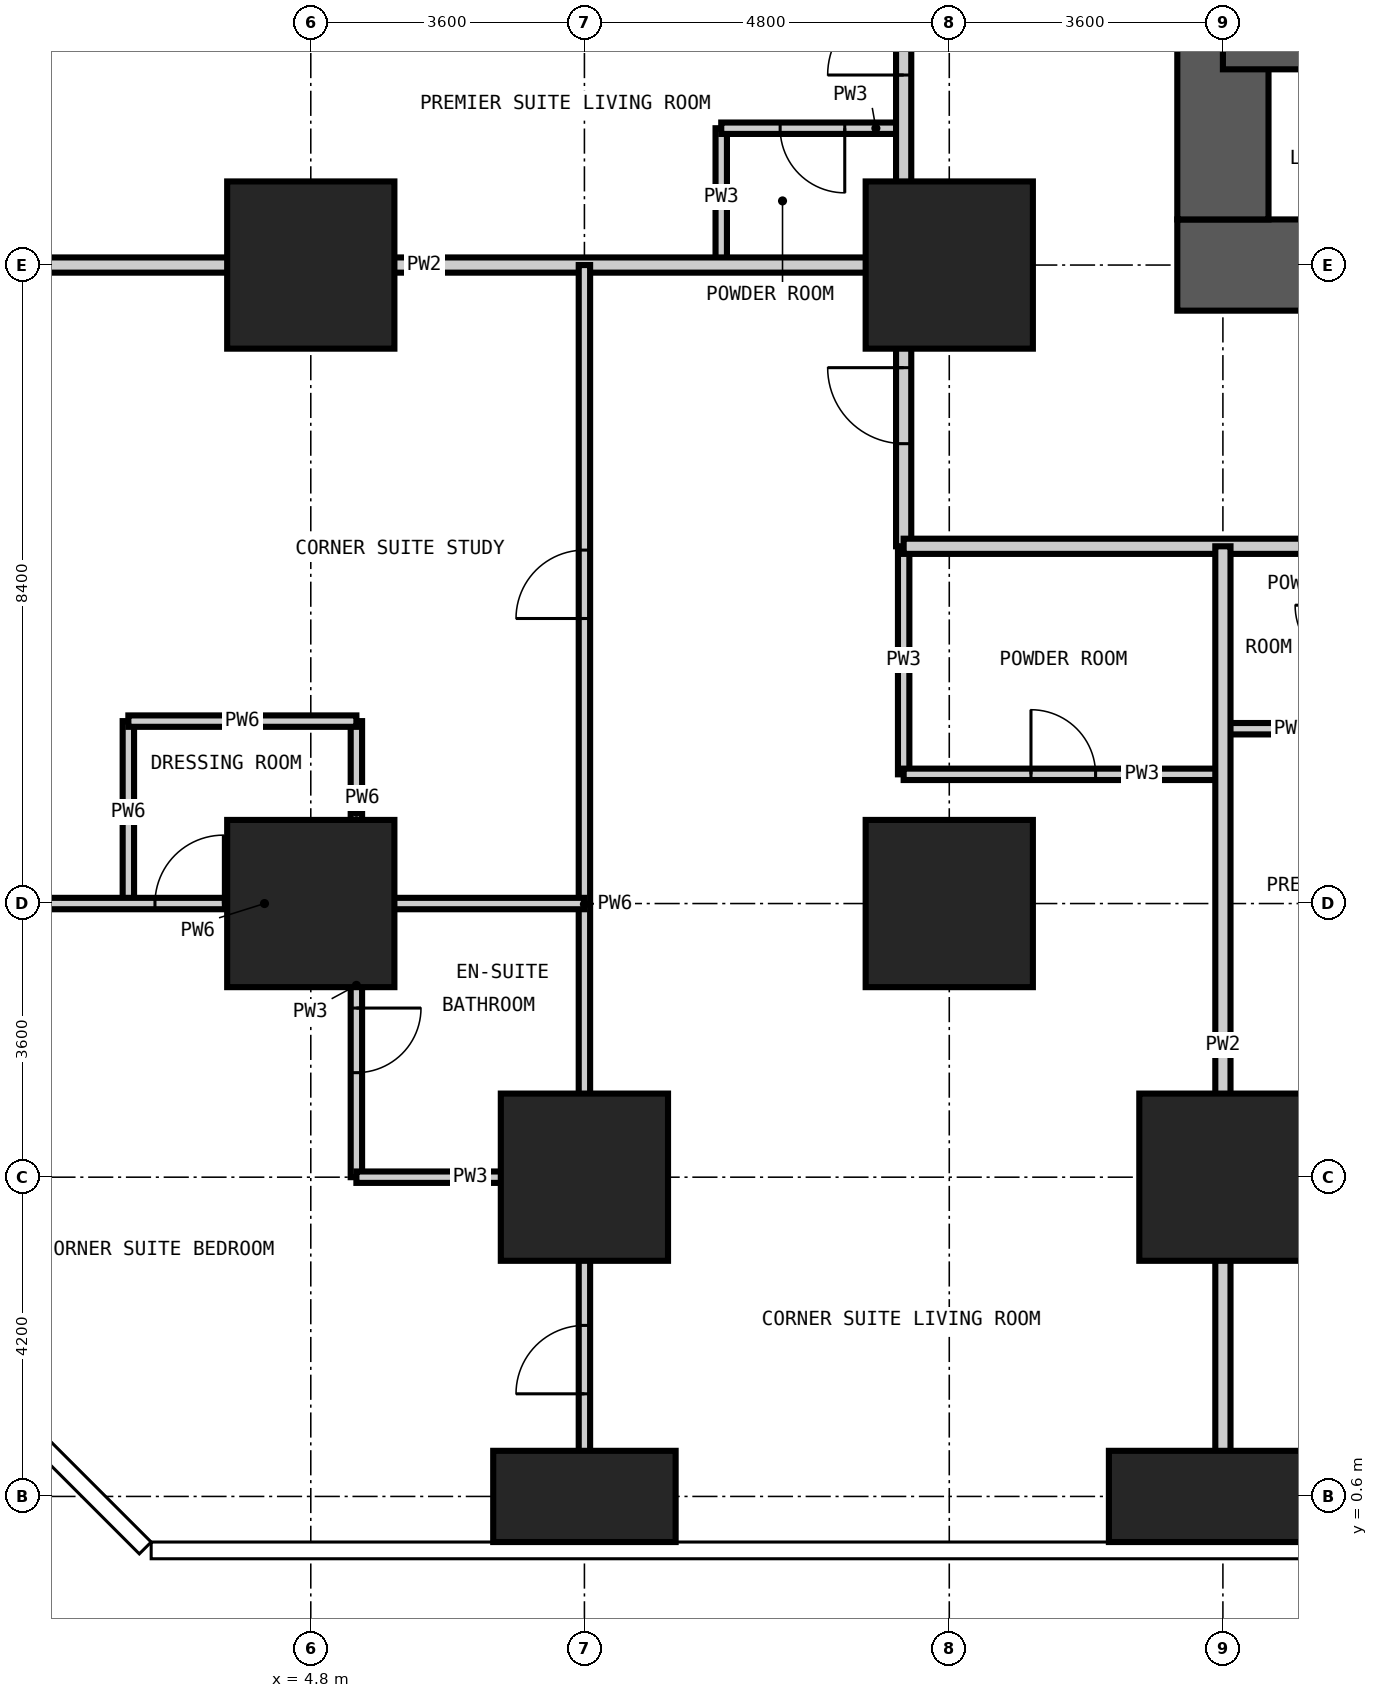
"""IFC4 building model, lengths in metres.
Left out: names, types, materials, properties, quantities, classifications, styles, units other than length and angle.
Written with IfcOpenShell. Run it as: python <this file> out.ifc"""

import sys

from ifc_helpers import new_model, si_unit, direction, frame, frame_2d, origin, origin_2d, place, context, subcontext, project, spatial, rectangle, extrude, element, fill, save


model = new_model("IFC4")
c1 = context("Model", 3, precision=1e-05, world=origin(), true_north=direction((0.0, 1.0)))
c2 = subcontext(c1, "Body", "Model", "MODEL_VIEW")
j1 = project(units=[si_unit("LENGTHUNIT", "METRE"), si_unit("PLANEANGLEUNIT", "RADIAN")], contexts=[c1])
p1 = place(None, origin())
s1 = spatial("IfcSite", under=j1, at=p1, CompositionType="ELEMENT")
p2 = place(p1, origin())
s2 = spatial("IfcBuilding", under=s1, at=p2, CompositionType="ELEMENT")
p3 = place(p2, frame((0.0, 0.0, 93.6)))
s3 = spatial("IfcBuildingStorey", under=s2, at=p3, CompositionType="ELEMENT", Elevation=93.6)
for number, where, z_axis, x_axis in (
    (1, (4.8, 8.4, -0.35), (0.0, 0.0, 1.0), (1.0, 0.0, 0.0)),
    (2, (4.8, 16.8, -0.35), (0.0, 0.0, 1.0), (1.0, 0.0, 0.0)),
):
    element("IfcColumn", number, at=place(p3, frame(where, z_axis=z_axis, x_axis=x_axis)), inside=s3, PredefinedType="COLUMN", context=c2, shape_type="SweptSolid", body=[
        extrude(rectangle(XDim=2.2, YDim=2.2, at=origin_2d()), origin(), (0.0, 0.0, 1.0), 3.6),
    ])
p4 = place(p3, frame((8.4, 0.6, -0.35), z_axis=(0.0, 0.0, 1.0), x_axis=(1.0, 0.0, 0.0)))
e3 = element("IfcColumn", 3, at=p4, inside=s3, PredefinedType="COLUMN", context=c2, shape_type="SweptSolid", body=[
    extrude(rectangle(XDim=2.4, YDim=1.2, at=origin_2d()), origin(), (0.0, 0.0, 1.0), 3.6),
])
for number, where, z_axis, x_axis in (
    (4, (8.4, 4.8, -0.35), (0.0, 0.0, 1.0), (1.0, 0.0, 0.0)),
    (5, (13.2, 8.4, -0.35), (0.0, 0.0, 1.0), (1.0, 0.0, 0.0)),
    (6, (13.2, 16.8, -0.35), (0.0, 0.0, 1.0), (1.0, 0.0, 0.0)),
):
    element("IfcColumn", number, at=place(p3, frame(where, z_axis=z_axis, x_axis=x_axis)), inside=s3, PredefinedType="COLUMN", context=c2, shape_type="SweptSolid", body=[
        extrude(rectangle(XDim=2.2, YDim=2.2, at=origin_2d()), origin(), (0.0, 0.0, 1.0), 3.6),
    ])
p5 = place(p3, frame((16.8, 0.6, -0.35), z_axis=(0.0, 0.0, 1.0), x_axis=(1.0, 0.0, 0.0)))
e7 = element("IfcColumn", 7, at=p5, inside=s3, PredefinedType="COLUMN", context=c2, shape_type="SweptSolid", body=[
    extrude(rectangle(XDim=3.0, YDim=1.2, at=origin_2d()), origin(), (0.0, 0.0, 1.0), 3.6),
])
p6 = place(p3, frame((16.8, 4.8, -0.35), z_axis=(0.0, 0.0, 1.0), x_axis=(1.0, 0.0, 0.0)))
e8 = element("IfcColumn", 8, at=p6, inside=s3, PredefinedType="COLUMN", context=c2, shape_type="SweptSolid", body=[
    extrude(rectangle(XDim=2.2, YDim=2.2, at=origin_2d()), origin(), (0.0, 0.0, 1.0), 3.6),
])
p7 = place(p3, frame((16.2, 16.8, -0.35), z_axis=(0.0, 0.0, 1.0), x_axis=(1.0, 0.0, 0.0)))
e9 = element("IfcWall", 9, at=p7, inside=s3, PredefinedType="SHEAR", context=c2, shape_type="SweptSolid", body=[
    extrude(rectangle(XDim=26.4, YDim=1.2, at=frame_2d((13.2, 0.0))), origin(), (0.0, 0.0, 1.0), 3.6),
])
p8 = place(p7, frame((12.7, 0.0, 0.35)))
e10 = element("IfcOpeningElement", 10, at=p8, cuts=e9, PredefinedType="OPENING", context=c2, shape_type="SweptSolid", body=[
    extrude(rectangle(XDim=1.0, YDim=2.1, at=frame_2d((0.5, 1.05))), frame((0.0, 0.61, 0.0), z_axis=(0.0, -1.0, 0.0), x_axis=(1.0, 0.0, 0.0)), (0.0, 0.0, 1.0), 1.22),
])
p9 = place(p7, frame((19.0, 0.0, 0.35)))
e11 = element("IfcOpeningElement", 11, at=p9, cuts=e9, PredefinedType="OPENING", context=c2, shape_type="SweptSolid", body=[
    extrude(rectangle(XDim=1.0, YDim=2.1, at=frame_2d((0.5, 1.05))), frame((0.0, 0.61, 0.0), z_axis=(0.0, -1.0, 0.0), x_axis=(1.0, 0.0, 0.0)), (0.0, 0.0, 1.0), 1.22),
])
p10 = place(p3, frame((16.8, 41.4, -0.35), z_axis=(0.0, 0.0, 1.0), x_axis=(0.0, -1.0, 0.0)))
e12 = element("IfcWall", 12, at=p10, inside=s3, PredefinedType="SHEAR", context=c2, shape_type="SweptSolid", body=[
    extrude(rectangle(XDim=24.0, YDim=1.2, at=frame_2d((12.0, 0.0))), origin(), (0.0, 0.0, 1.0), 3.6),
])
p11 = place(p10, frame((11.1, 0.0, 0.35)))
e13 = element("IfcOpeningElement", 13, at=p11, cuts=e12, PredefinedType="OPENING", context=c2, shape_type="SweptSolid", body=[
    extrude(rectangle(XDim=1.8, YDim=2.2, at=frame_2d((0.9, 1.1))), frame((0.0, 0.61, 0.0), z_axis=(0.0, -1.0, 0.0), x_axis=(1.0, 0.0, 0.0)), (0.0, 0.0, 1.0), 1.22),
])
p12 = place(p10, frame((19.9, 0.0, 0.35)))
e14 = element("IfcOpeningElement", 14, at=p12, cuts=e12, PredefinedType="OPENING", context=c2, shape_type="SweptSolid", body=[
    extrude(rectangle(XDim=1.0, YDim=2.1, at=frame_2d((0.5, 1.05))), frame((0.0, 0.61, 0.0), z_axis=(0.0, -1.0, 0.0), x_axis=(1.0, 0.0, 0.0)), (0.0, 0.0, 1.0), 1.22),
])
p13 = place(p10, frame((5.2, 0.0, 0.35)))
e15 = element("IfcOpeningElement", 15, at=p13, cuts=e12, PredefinedType="OPENING", context=c2, shape_type="SweptSolid", body=[
    extrude(rectangle(XDim=1.0, YDim=2.1, at=frame_2d((0.5, 1.05))), frame((0.0, 0.61, 0.0), z_axis=(0.0, -1.0, 0.0), x_axis=(1.0, 0.0, 0.0)), (0.0, 0.0, 1.0), 1.22),
])
p14 = place(p3, frame((16.8, 19.6, -0.35), z_axis=(0.0, 0.0, 1.0), x_axis=(1.0, 0.0, 0.0)))
e16 = element("IfcWall", 16, at=p14, inside=s3, PredefinedType="SHEAR", context=c2, shape_type="SweptSolid", body=[
    extrude(rectangle(XDim=8.4, YDim=0.45, at=frame_2d((4.2, 0.0))), origin(), (0.0, 0.0, 1.0), 3.6),
])
p15 = place(p3, frame((5.4, 4.8, 0.0), z_axis=(0.0, 0.0, 1.0), x_axis=(0.0, 1.0, 0.0)))
e17 = element("IfcWall", 17, at=p15, inside=s3, PredefinedType="PARTITIONING", context=c2, shape_type="SweptSolid", body=[
    extrude(rectangle(XDim=3.6, YDim=0.15, at=frame_2d((1.8, 0.0))), origin(), (0.0, 0.0, 1.0), 3.25),
])
p16 = place(p15, frame((1.375, 0.0, 0.0)))
e18 = element("IfcOpeningElement", 18, at=p16, cuts=e17, PredefinedType="OPENING", context=c2, shape_type="SweptSolid", body=[
    extrude(rectangle(XDim=0.85, YDim=2.1, at=frame_2d((0.425, 1.05))), frame((0.0, 0.085, 0.0), z_axis=(0.0, -1.0, 0.0), x_axis=(1.0, 0.0, 0.0)), (0.0, 0.0, 1.0), 0.17),
])
p17 = place(p3, frame((10.2, 16.8, 0.0), z_axis=(0.0, 0.0, 1.0), x_axis=(0.0, 1.0, 0.0)))
e19 = element("IfcWall", 19, at=p17, inside=s3, PredefinedType="PARTITIONING", context=c2, shape_type="SweptSolid", body=[
    extrude(rectangle(XDim=1.8, YDim=0.15, at=frame_2d((0.9, 0.0))), origin(), (0.0, 0.0, 1.0), 3.25),
])
for number, where, z_axis, x_axis in (
    (20, (12.6, 10.1, 0.0), (0.0, 0.0, 1.0), (0.0, 1.0, 0.0)),
    (21, (5.4, 4.8, 0.0), (0.0, 0.0, 1.0), (1.0, 0.0, 0.0)),
):
    element("IfcWall", number, at=place(p3, frame(where, z_axis=z_axis, x_axis=x_axis)), inside=s3, PredefinedType="PARTITIONING", context=c2, shape_type="SweptSolid", body=[
        extrude(rectangle(XDim=3.0, YDim=0.15, at=frame_2d((1.5, 0.0))), origin(), (0.0, 0.0, 1.0), 3.25),
    ])
p18 = place(p3, frame((12.6, 10.1, 0.0), z_axis=(0.0, 0.0, 1.0), x_axis=(1.0, 0.0, 0.0)))
e22 = element("IfcWall", 22, at=p18, inside=s3, PredefinedType="PARTITIONING", context=c2, shape_type="SweptSolid", body=[
    extrude(rectangle(XDim=4.2, YDim=0.15, at=frame_2d((2.1, 0.0))), origin(), (0.0, 0.0, 1.0), 3.25),
])
p19 = place(p18, frame((1.675, 0.0, 0.0)))
e23 = element("IfcOpeningElement", 23, at=p19, cuts=e22, PredefinedType="OPENING", context=c2, shape_type="SweptSolid", body=[
    extrude(rectangle(XDim=0.85, YDim=2.1, at=frame_2d((0.425, 1.05))), frame((0.0, 0.085, 0.0), z_axis=(0.0, -1.0, 0.0), x_axis=(1.0, 0.0, 0.0)), (0.0, 0.0, 1.0), 0.17),
])
p20 = place(p3, frame((16.8, 10.7, 0.0), z_axis=(0.0, 0.0, 1.0), x_axis=(1.0, 0.0, 0.0)))
e24 = element("IfcWall", 24, at=p20, inside=s3, PredefinedType="PARTITIONING", context=c2, shape_type="SweptSolid", body=[
    extrude(rectangle(XDim=1.8, YDim=0.15, at=frame_2d((0.9, 0.0))), origin(), (0.0, 0.0, 1.0), 3.25),
])
p21 = place(p3, frame((10.2, 18.6, 0.0), z_axis=(0.0, 0.0, 1.0), x_axis=(1.0, 0.0, 0.0)))
e25 = element("IfcWall", 25, at=p21, inside=s3, PredefinedType="PARTITIONING", context=c2, shape_type="SweptSolid", body=[
    extrude(rectangle(XDim=2.4, YDim=0.15, at=frame_2d((1.2, 0.0))), origin(), (0.0, 0.0, 1.0), 3.25),
])
p22 = place(p21, frame((0.775, 0.0, 0.0)))
e26 = element("IfcOpeningElement", 26, at=p22, cuts=e25, PredefinedType="OPENING", context=c2, shape_type="SweptSolid", body=[
    extrude(rectangle(XDim=0.85, YDim=2.1, at=frame_2d((0.425, 1.05))), frame((0.0, 0.085, 0.0), z_axis=(0.0, -1.0, 0.0), x_axis=(1.0, 0.0, 0.0)), (0.0, 0.0, 1.0), 0.17),
])
p23 = place(p3, frame((12.6, 13.1, 0.0), z_axis=(0.0, 0.0, 1.0), x_axis=(0.0, 1.0, 0.0)))
e27 = element("IfcWall", 27, at=p23, inside=s3, PredefinedType="PARTITIONING", context=c2, shape_type="SweptSolid", body=[
    extrude(rectangle(XDim=31.4, YDim=0.2, at=frame_2d((15.7, 0.0))), origin(), (0.0, 0.0, 1.0), 3.25),
])
p24 = place(p23, frame((6.2, 0.0, 0.0)))
e28 = element("IfcOpeningElement", 28, at=p24, cuts=e27, PredefinedType="OPENING", context=c2, shape_type="SweptSolid", body=[
    extrude(rectangle(XDim=1.0, YDim=2.2, at=frame_2d((0.5, 1.1))), frame((0.0, 0.11, 0.0), z_axis=(0.0, -1.0, 0.0), x_axis=(1.0, 0.0, 0.0)), (0.0, 0.0, 1.0), 0.22),
])
p25 = place(p23, frame((17.0, 0.0, 0.0)))
e29 = element("IfcOpeningElement", 29, at=p25, cuts=e27, PredefinedType="OPENING", context=c2, shape_type="SweptSolid", body=[
    extrude(rectangle(XDim=1.0, YDim=2.2, at=frame_2d((0.5, 1.1))), frame((0.0, 0.11, 0.0), z_axis=(0.0, -1.0, 0.0), x_axis=(1.0, 0.0, 0.0)), (0.0, 0.0, 1.0), 0.22),
])
p26 = place(p23, frame((23.0, 0.0, 0.0)))
e30 = element("IfcOpeningElement", 30, at=p26, cuts=e27, PredefinedType="OPENING", context=c2, shape_type="SweptSolid", body=[
    extrude(rectangle(XDim=1.0, YDim=2.2, at=frame_2d((0.5, 1.1))), frame((0.0, 0.11, 0.0), z_axis=(0.0, -1.0, 0.0), x_axis=(1.0, 0.0, 0.0)), (0.0, 0.0, 1.0), 0.22),
])
p27 = place(p23, frame((1.35, 0.0, 0.0)))
e31 = element("IfcOpeningElement", 31, at=p27, cuts=e27, PredefinedType="OPENING", context=c2, shape_type="SweptSolid", body=[
    extrude(rectangle(XDim=1.0, YDim=2.2, at=frame_2d((0.5, 1.1))), frame((0.0, 0.11, 0.0), z_axis=(0.0, -1.0, 0.0), x_axis=(1.0, 0.0, 0.0)), (0.0, 0.0, 1.0), 0.22),
])
p28 = place(p23, frame((30.05, 0.0, 0.0)))
e32 = element("IfcOpeningElement", 32, at=p28, cuts=e27, PredefinedType="OPENING", context=c2, shape_type="SweptSolid", body=[
    extrude(rectangle(XDim=1.0, YDim=2.2, at=frame_2d((0.5, 1.1))), frame((0.0, 0.11, 0.0), z_axis=(0.0, -1.0, 0.0), x_axis=(1.0, 0.0, 0.0)), (0.0, 0.0, 1.0), 0.22),
])
p29 = place(p3, frame((45.1, 13.1, 0.0), z_axis=(0.0, 0.0, 1.0), x_axis=(-1.0, 0.0, 0.0)))
e33 = element("IfcWall", 33, at=p29, inside=s3, PredefinedType="PARTITIONING", context=c2, shape_type="SweptSolid", body=[
    extrude(rectangle(XDim=32.5, YDim=0.2, at=frame_2d((16.25, 0.0))), origin(), (0.0, 0.0, 1.0), 3.25),
])
p30 = place(p29, frame((24.8, 0.0, 0.0)))
e34 = element("IfcOpeningElement", 34, at=p30, cuts=e33, PredefinedType="OPENING", context=c2, shape_type="SweptSolid", body=[
    extrude(rectangle(XDim=1.0, YDim=2.2, at=frame_2d((0.5, 1.1))), frame((0.0, 0.11, 0.0), z_axis=(0.0, -1.0, 0.0), x_axis=(1.0, 0.0, 0.0)), (0.0, 0.0, 1.0), 0.22),
])
p31 = place(p29, frame((14.0, 0.0, 0.0)))
e35 = element("IfcOpeningElement", 35, at=p31, cuts=e33, PredefinedType="OPENING", context=c2, shape_type="SweptSolid", body=[
    extrude(rectangle(XDim=1.0, YDim=2.2, at=frame_2d((0.5, 1.1))), frame((0.0, 0.11, 0.0), z_axis=(0.0, -1.0, 0.0), x_axis=(1.0, 0.0, 0.0)), (0.0, 0.0, 1.0), 0.22),
])
p32 = place(p29, frame((8.0, 0.0, 0.0)))
e36 = element("IfcOpeningElement", 36, at=p32, cuts=e33, PredefinedType="OPENING", context=c2, shape_type="SweptSolid", body=[
    extrude(rectangle(XDim=1.0, YDim=2.2, at=frame_2d((0.5, 1.1))), frame((0.0, 0.11, 0.0), z_axis=(0.0, -1.0, 0.0), x_axis=(1.0, 0.0, 0.0)), (0.0, 0.0, 1.0), 0.22),
])
p33 = place(p3, frame((16.8, -0.018, 0.0), z_axis=(0.0, 0.0, 1.0), x_axis=(0.0, 1.0, 0.0)))
e37 = element("IfcWall", 37, at=p33, inside=s3, PredefinedType="PARTITIONING", context=c2, shape_type="SweptSolid", body=[
    extrude(rectangle(XDim=13.118, YDim=0.2, at=frame_2d((6.559, 0.0))), origin(), (0.0, 0.0, 1.0), 3.25),
])
p34 = place(p3, frame((-0.018, 16.8, 0.0), z_axis=(0.0, 0.0, 1.0), x_axis=(1.0, 0.0, 0.0)))
e38 = element("IfcWall", 38, at=p34, inside=s3, PredefinedType="PARTITIONING", context=c2, shape_type="SweptSolid", body=[
    extrude(rectangle(XDim=12.618, YDim=0.2, at=frame_2d((6.309, 0.0))), origin(), (0.0, 0.0, 1.0), 3.25),
])
for number, where, z_axis, x_axis in (
    (39, (2.4, 8.4, 0.0), (0.0, 0.0, 1.0), (0.0, 1.0, 0.0)),
    (40, (5.4, 8.4, 0.0), (0.0, 0.0, 1.0), (0.0, 1.0, 0.0)),
):
    element("IfcWall", number, at=place(p3, frame(where, z_axis=z_axis, x_axis=x_axis)), inside=s3, PredefinedType="PARTITIONING", context=c2, shape_type="SweptSolid", body=[
        extrude(rectangle(XDim=2.4, YDim=0.15, at=frame_2d((1.2, 0.0))), origin(), (0.0, 0.0, 1.0), 3.25),
    ])
p35 = place(p3, frame((8.4, -0.018, 0.0), z_axis=(0.0, 0.0, 1.0), x_axis=(0.0, 1.0, 0.0)))
e41 = element("IfcWall", 41, at=p35, inside=s3, PredefinedType="PARTITIONING", context=c2, shape_type="SweptSolid", body=[
    extrude(rectangle(XDim=16.818, YDim=0.15, at=frame_2d((8.409, 0.0))), origin(), (0.0, 0.0, 1.0), 3.25),
])
p36 = place(p35, frame((1.968, 0.0, 0.0)))
e42 = element("IfcOpeningElement", 42, at=p36, cuts=e41, PredefinedType="OPENING", context=c2, shape_type="SweptSolid", body=[
    extrude(rectangle(XDim=0.9, YDim=2.1, at=frame_2d((0.45, 1.05))), frame((0.0, 0.085, 0.0), z_axis=(0.0, -1.0, 0.0), x_axis=(1.0, 0.0, 0.0)), (0.0, 0.0, 1.0), 0.17),
])
p37 = place(p35, frame((12.168, 0.0, 0.0)))
e43 = element("IfcOpeningElement", 43, at=p37, cuts=e41, PredefinedType="OPENING", context=c2, shape_type="SweptSolid", body=[
    extrude(rectangle(XDim=0.9, YDim=2.1, at=frame_2d((0.45, 1.05))), frame((0.0, 0.085, 0.0), z_axis=(0.0, -1.0, 0.0), x_axis=(1.0, 0.0, 0.0)), (0.0, 0.0, 1.0), 0.17),
])
p38 = place(p3, frame((-0.018, 8.4, 0.0), z_axis=(0.0, 0.0, 1.0), x_axis=(1.0, 0.0, 0.0)))
e44 = element("IfcWall", 44, at=p38, inside=s3, PredefinedType="PARTITIONING", context=c2, shape_type="SweptSolid", body=[
    extrude(rectangle(XDim=8.418, YDim=0.15, at=frame_2d((4.209, 0.0))), origin(), (0.0, 0.0, 1.0), 3.25),
])
p39 = place(p38, frame((2.768, 0.0, 0.0)))
e45 = element("IfcOpeningElement", 45, at=p39, cuts=e44, PredefinedType="OPENING", context=c2, shape_type="SweptSolid", body=[
    extrude(rectangle(XDim=0.9, YDim=2.1, at=frame_2d((0.45, 1.05))), frame((0.0, 0.085, 0.0), z_axis=(0.0, -1.0, 0.0), x_axis=(1.0, 0.0, 0.0)), (0.0, 0.0, 1.0), 0.17),
])
p40 = place(p3, frame((2.4, 10.8, 0.0), z_axis=(0.0, 0.0, 1.0), x_axis=(1.0, 0.0, 0.0)))
e46 = element("IfcWall", 46, at=p40, inside=s3, PredefinedType="PARTITIONING", context=c2, shape_type="SweptSolid", body=[
    extrude(rectangle(XDim=3.0, YDim=0.15, at=frame_2d((1.5, 0.0))), origin(), (0.0, 0.0, 1.0), 3.25),
])
p41 = place(p24, origin())
e47 = element("IfcDoor", 47, at=p41, inside=s3, OperationType="SINGLE_SWING_LEFT", PredefinedType="DOOR", context=c2, shape_type="SweptSolid", body=[
    extrude(rectangle(XDim=1.0, YDim=2.2, at=frame_2d((0.5, 1.1))), frame((0.0, 0.025, 0.0), z_axis=(0.0, -1.0, 0.0), x_axis=(1.0, 0.0, 0.0)), (0.0, 0.0, 1.0), 0.05),
])
fill(e28, e47)
p42 = place(p22, frame((0.85, 0.0, 0.0), z_axis=(0.0, 0.0, 1.0), x_axis=(-1.0, 0.0, 0.0)))
e48 = element("IfcDoor", 48, at=p42, inside=s3, OperationType="SINGLE_SWING_LEFT", PredefinedType="DOOR", context=c2, shape_type="SweptSolid", body=[
    extrude(rectangle(XDim=0.85, YDim=2.1, at=frame_2d((0.425, 1.05))), frame((0.0, 0.025, 0.0), z_axis=(0.0, -1.0, 0.0), x_axis=(1.0, 0.0, 0.0)), (0.0, 0.0, 1.0), 0.05),
])
fill(e26, e48)
p43 = place(p27, origin())
e49 = element("IfcDoor", 49, at=p43, inside=s3, OperationType="SINGLE_SWING_RIGHT", PredefinedType="DOOR", context=c2, shape_type="SweptSolid", body=[
    extrude(rectangle(XDim=1.0, YDim=2.2, at=frame_2d((0.5, 1.1))), frame((0.0, 0.025, 0.0), z_axis=(0.0, -1.0, 0.0), x_axis=(1.0, 0.0, 0.0)), (0.0, 0.0, 1.0), 0.05),
])
fill(e31, e49)
p44 = place(p19, origin())
e50 = element("IfcDoor", 50, at=p44, inside=s3, OperationType="SINGLE_SWING_LEFT", PredefinedType="DOOR", context=c2, shape_type="SweptSolid", body=[
    extrude(rectangle(XDim=0.85, YDim=2.1, at=frame_2d((0.425, 1.05))), frame((0.0, 0.025, 0.0), z_axis=(0.0, -1.0, 0.0), x_axis=(1.0, 0.0, 0.0)), (0.0, 0.0, 1.0), 0.05),
])
fill(e23, e50)
p45 = place(p36, origin())
e51 = element("IfcDoor", 51, at=p45, inside=s3, OperationType="SINGLE_SWING_LEFT", PredefinedType="DOOR", context=c2, shape_type="SweptSolid", body=[
    extrude(rectangle(XDim=0.9, YDim=2.1, at=frame_2d((0.45, 1.05))), frame((0.0, 0.025, 0.0), z_axis=(0.0, -1.0, 0.0), x_axis=(1.0, 0.0, 0.0)), (0.0, 0.0, 1.0), 0.05),
])
fill(e42, e51)
p46 = place(p16, frame((0.85, 0.0, 0.0), z_axis=(0.0, 0.0, 1.0), x_axis=(-1.0, 0.0, 0.0)))
e52 = element("IfcDoor", 52, at=p46, inside=s3, OperationType="SINGLE_SWING_LEFT", PredefinedType="DOOR", context=c2, shape_type="SweptSolid", body=[
    extrude(rectangle(XDim=0.85, YDim=2.1, at=frame_2d((0.425, 1.05))), frame((0.0, 0.025, 0.0), z_axis=(0.0, -1.0, 0.0), x_axis=(1.0, 0.0, 0.0)), (0.0, 0.0, 1.0), 0.05),
])
fill(e18, e52)
p47 = place(p39, origin())
e53 = element("IfcDoor", 53, at=p47, inside=s3, OperationType="SINGLE_SWING_RIGHT", PredefinedType="DOOR", context=c2, shape_type="SweptSolid", body=[
    extrude(rectangle(XDim=0.9, YDim=2.1, at=frame_2d((0.45, 1.05))), frame((0.0, 0.025, 0.0), z_axis=(0.0, -1.0, 0.0), x_axis=(1.0, 0.0, 0.0)), (0.0, 0.0, 1.0), 0.05),
])
fill(e45, e53)
p48 = place(p37, origin())
e54 = element("IfcDoor", 54, at=p48, inside=s3, OperationType="SINGLE_SWING_LEFT", PredefinedType="DOOR", context=c2, shape_type="SweptSolid", body=[
    extrude(rectangle(XDim=0.9, YDim=2.1, at=frame_2d((0.45, 1.05))), frame((0.0, 0.025, 0.0), z_axis=(0.0, -1.0, 0.0), x_axis=(1.0, 0.0, 0.0)), (0.0, 0.0, 1.0), 0.05),
])
fill(e43, e54)
save(model, sys.argv[1])
